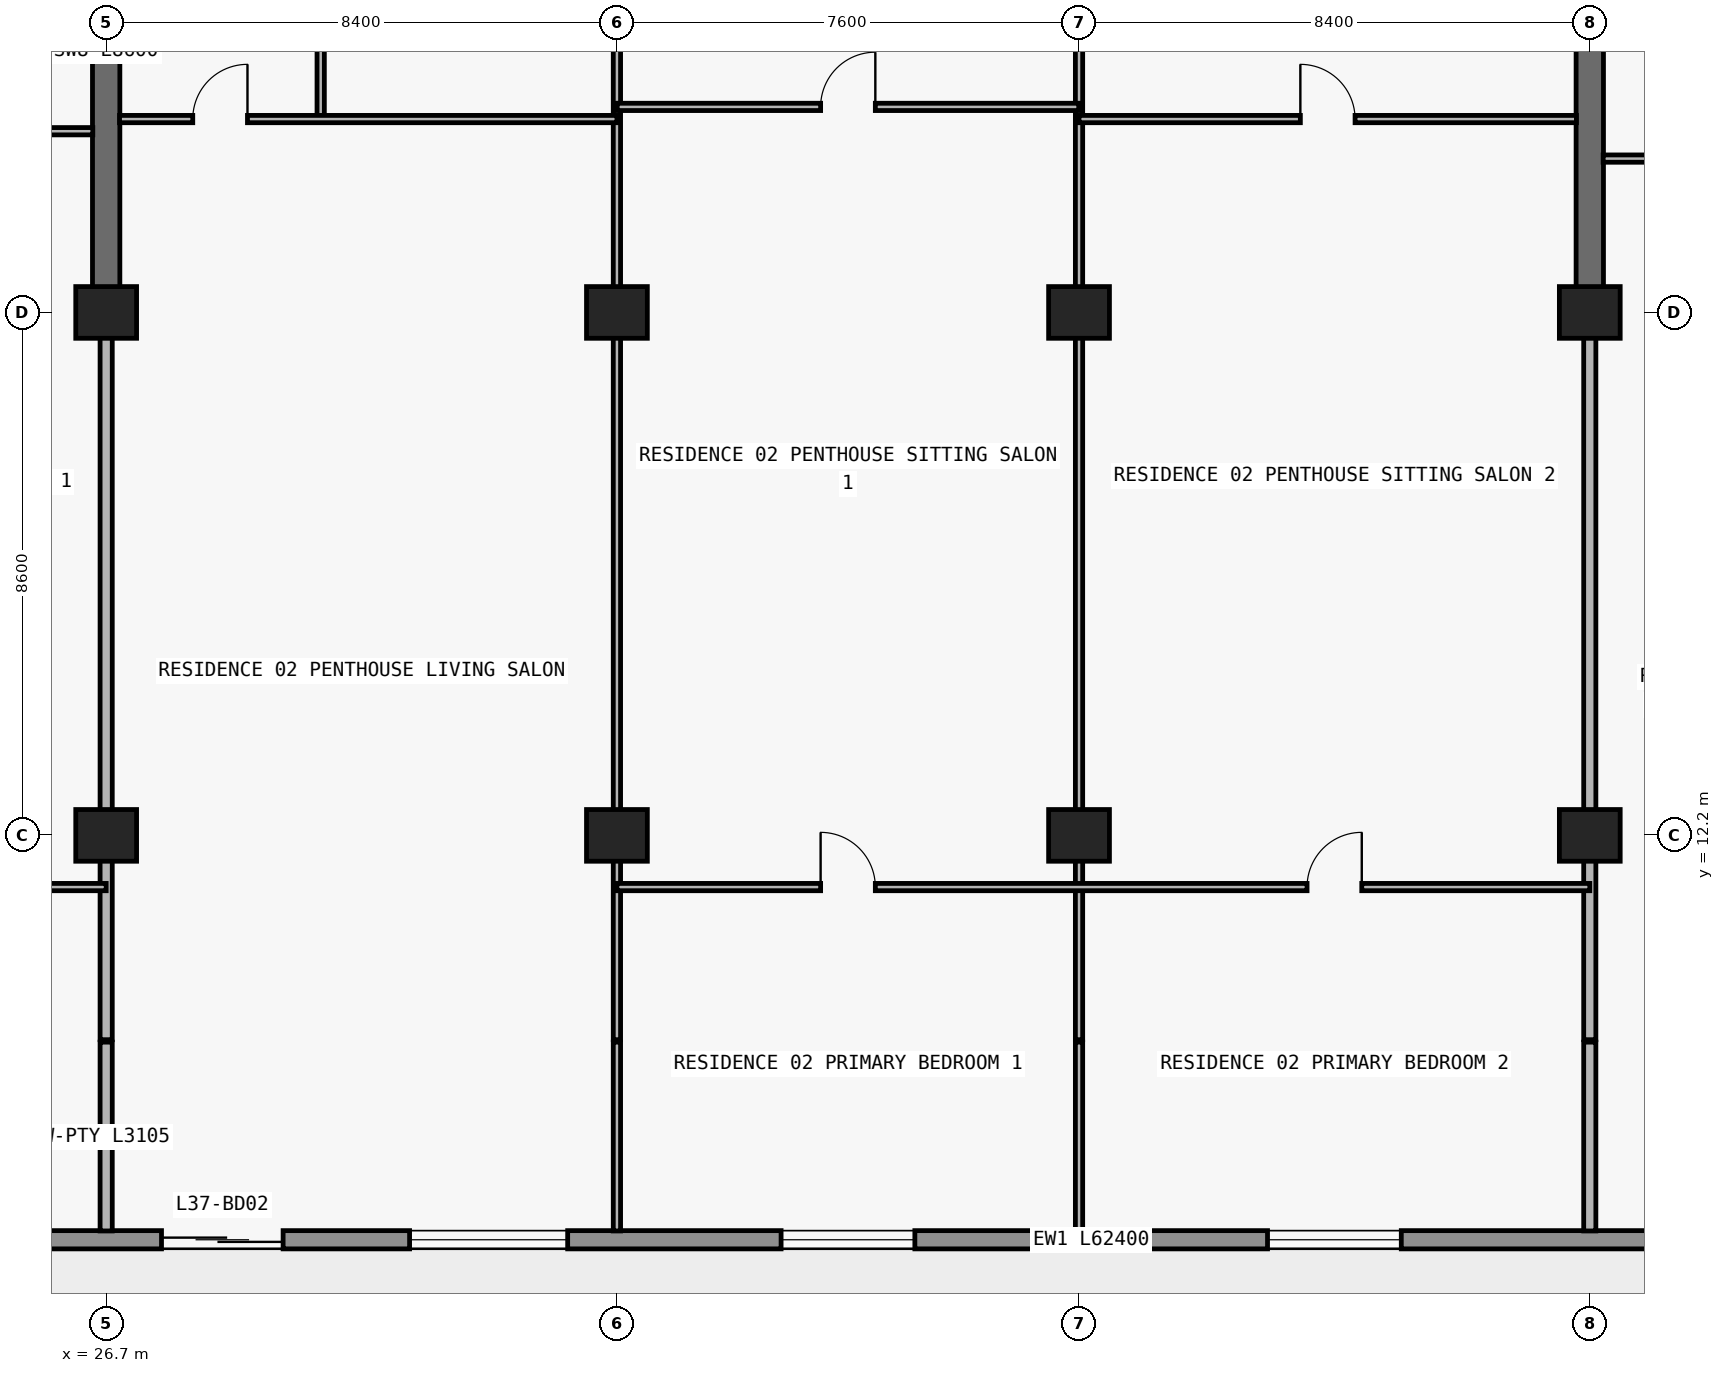
"""IFC4 building model, lengths in metres.
Left out: names, types, materials, properties, quantities, classifications, styles, units other than length and angle.
Written with IfcOpenShell. Run it as: python <this file> out.ifc"""

import sys

from ifc_helpers import new_model, si_unit, direction, frame, frame_2d, origin, origin_2d, place, context, subcontext, project, spatial, rectangle, extrude, element, fill, save


model = new_model("IFC4")
c1 = context("Model", 3, precision=1e-05, world=origin(), true_north=direction((0.0, 1.0)))
c2 = subcontext(c1, "Body", "Model", "MODEL_VIEW")
j1 = project(units=[si_unit("LENGTHUNIT", "METRE"), si_unit("PLANEANGLEUNIT", "RADIAN")], contexts=[c1])
p1 = place(None, origin())
s1 = spatial("IfcSite", under=j1, at=p1, CompositionType="ELEMENT")
p2 = place(p1, origin())
s2 = spatial("IfcBuilding", under=s1, at=p2, CompositionType="ELEMENT")
p3 = place(p2, frame((0.0, 0.0, 135.6)))
s3 = spatial("IfcBuildingStorey", under=s2, at=p3, CompositionType="ELEMENT", Elevation=135.6)
for number, where, z_axis, x_axis in (
    (1, (26.7, 12.2, 0.0), (0.0, 0.0, 1.0), (1.0, 0.0, 0.0)),
    (2, (35.1, 12.2, 0.0), (0.0, 0.0, 1.0), (1.0, 0.0, 0.0)),
    (3, (42.7, 12.2, 0.0), (0.0, 0.0, 1.0), (1.0, 0.0, 0.0)),
    (4, (51.1, 12.2, 0.0), (0.0, 0.0, 1.0), (1.0, 0.0, 0.0)),
    (5, (26.7, 20.8, 0.0), (0.0, 0.0, 1.0), (1.0, 0.0, 0.0)),
    (6, (35.1, 20.8, 0.0), (0.0, 0.0, 1.0), (1.0, 0.0, 0.0)),
    (7, (42.7, 20.8, 0.0), (0.0, 0.0, 1.0), (1.0, 0.0, 0.0)),
    (8, (51.1, 20.8, 0.0), (0.0, 0.0, 1.0), (1.0, 0.0, 0.0)),
):
    element("IfcColumn", number, at=place(p3, frame(where, z_axis=z_axis, x_axis=x_axis)), inside=s3, PredefinedType="COLUMN", context=c2, shape_type="SweptSolid", body=[
        extrude(rectangle(XDim=1.0, YDim=0.85, at=origin_2d()), origin(), (0.0, 0.0, 1.0), 3.05),
    ])
for number, where, z_axis, x_axis in (
    (9, (26.7, 20.8, 0.0), (0.0, 0.0, 1.0), (0.0, 1.0, 0.0)),
    (10, (51.1, 20.8, 0.0), (0.0, 0.0, 1.0), (0.0, 1.0, 0.0)),
):
    element("IfcWall", number, at=place(p3, frame(where, z_axis=z_axis, x_axis=x_axis)), inside=s3, PredefinedType="SHEAR", context=c2, shape_type="SweptSolid", body=[
        extrude(rectangle(XDim=8.6, YDim=0.45, at=frame_2d((4.3, 0.0))), origin(), (0.0, 0.0, 1.0), 3.05),
    ])
p4 = place(p3, frame((70.1, 5.55, 0.0), z_axis=(0.0, 0.0, 1.0), x_axis=(-1.0, 0.0, 0.0)))
e11 = element("IfcWall", 11, at=p4, inside=s3, PredefinedType="STANDARD", context=c2, shape_type="SweptSolid", body=[
    extrude(rectangle(XDim=62.4, YDim=0.3, at=frame_2d((31.2, 0.0))), origin(), (0.0, 0.0, 1.0), 3.05),
])
p5 = place(p4, frame((57.29, 0.0, 0.0)))
e12 = element("IfcOpeningElement", 12, at=p5, cuts=e11, PredefinedType="OPENING", context=c2, shape_type="SweptSolid", body=[
    extrude(rectangle(XDim=2.0, YDim=2.3, at=frame_2d((1.0, 1.15))), frame((0.0, 0.16, 0.0), z_axis=(0.0, -1.0, 0.0), x_axis=(1.0, 0.0, 0.0)), (0.0, 0.0, 1.0), 0.32),
])
p6 = place(p4, frame((52.61, 0.0, 0.65)))
e13 = element("IfcOpeningElement", 13, at=p6, cuts=e11, PredefinedType="OPENING", context=c2, shape_type="SweptSolid", body=[
    extrude(rectangle(XDim=2.6, YDim=1.85, at=frame_2d((1.3, 0.925))), frame((0.0, 0.16, 0.0), z_axis=(0.0, -1.0, 0.0), x_axis=(1.0, 0.0, 0.0)), (0.0, 0.0, 1.0), 0.32),
])
p7 = place(p4, frame((46.5, 0.0, 0.85)))
e14 = element("IfcOpeningElement", 14, at=p7, cuts=e11, PredefinedType="OPENING", context=c2, shape_type="SweptSolid", body=[
    extrude(rectangle(XDim=2.2, YDim=1.55, at=frame_2d((1.1, 0.775))), frame((0.0, 0.16, 0.0), z_axis=(0.0, -1.0, 0.0), x_axis=(1.0, 0.0, 0.0)), (0.0, 0.0, 1.0), 0.32),
])
p8 = place(p4, frame((40.49, 0.0, 0.0)))
e15 = element("IfcOpeningElement", 15, at=p8, cuts=e11, PredefinedType="OPENING", context=c2, shape_type="SweptSolid", body=[
    extrude(rectangle(XDim=2.0, YDim=2.3, at=frame_2d((1.0, 1.15))), frame((0.0, 0.16, 0.0), z_axis=(0.0, -1.0, 0.0), x_axis=(1.0, 0.0, 0.0)), (0.0, 0.0, 1.0), 0.32),
])
p9 = place(p4, frame((35.81, 0.0, 0.65)))
e16 = element("IfcOpeningElement", 16, at=p9, cuts=e11, PredefinedType="OPENING", context=c2, shape_type="SweptSolid", body=[
    extrude(rectangle(XDim=2.6, YDim=1.85, at=frame_2d((1.3, 0.925))), frame((0.0, 0.16, 0.0), z_axis=(0.0, -1.0, 0.0), x_axis=(1.0, 0.0, 0.0)), (0.0, 0.0, 1.0), 0.32),
])
p10 = place(p4, frame((30.1, 0.0, 0.85)))
e17 = element("IfcOpeningElement", 17, at=p10, cuts=e11, PredefinedType="OPENING", context=c2, shape_type="SweptSolid", body=[
    extrude(rectangle(XDim=2.2, YDim=1.55, at=frame_2d((1.1, 0.775))), frame((0.0, 0.16, 0.0), z_axis=(0.0, -1.0, 0.0), x_axis=(1.0, 0.0, 0.0)), (0.0, 0.0, 1.0), 0.32),
])
p11 = place(p4, frame((22.1, 0.0, 0.85)))
e18 = element("IfcOpeningElement", 18, at=p11, cuts=e11, PredefinedType="OPENING", context=c2, shape_type="SweptSolid", body=[
    extrude(rectangle(XDim=2.2, YDim=1.55, at=frame_2d((1.1, 0.775))), frame((0.0, 0.16, 0.0), z_axis=(0.0, -1.0, 0.0), x_axis=(1.0, 0.0, 0.0)), (0.0, 0.0, 1.0), 0.32),
])
p12 = place(p4, frame((16.026, 0.0, 0.0)))
e19 = element("IfcOpeningElement", 19, at=p12, cuts=e11, PredefinedType="OPENING", context=c2, shape_type="SweptSolid", body=[
    extrude(rectangle(XDim=2.0, YDim=2.3, at=frame_2d((1.0, 1.15))), frame((0.0, 0.16, 0.0), z_axis=(0.0, -1.0, 0.0), x_axis=(1.0, 0.0, 0.0)), (0.0, 0.0, 1.0), 0.32),
])
p13 = place(p4, frame((11.726, 0.0, 0.85)))
e20 = element("IfcOpeningElement", 20, at=p13, cuts=e11, PredefinedType="OPENING", context=c2, shape_type="SweptSolid", body=[
    extrude(rectangle(XDim=2.2, YDim=1.55, at=frame_2d((1.1, 0.775))), frame((0.0, 0.16, 0.0), z_axis=(0.0, -1.0, 0.0), x_axis=(1.0, 0.0, 0.0)), (0.0, 0.0, 1.0), 0.32),
])
p14 = place(p4, frame((7.29, 0.0, 0.0)))
e21 = element("IfcOpeningElement", 21, at=p14, cuts=e11, PredefinedType="OPENING", context=c2, shape_type="SweptSolid", body=[
    extrude(rectangle(XDim=2.0, YDim=2.3, at=frame_2d((1.0, 1.15))), frame((0.0, 0.16, 0.0), z_axis=(0.0, -1.0, 0.0), x_axis=(1.0, 0.0, 0.0)), (0.0, 0.0, 1.0), 0.32),
])
p15 = place(p4, frame((3.19, 0.0, 0.85)))
e22 = element("IfcOpeningElement", 22, at=p15, cuts=e11, PredefinedType="OPENING", context=c2, shape_type="SweptSolid", body=[
    extrude(rectangle(XDim=1.8, YDim=1.55, at=frame_2d((0.9, 0.775))), frame((0.0, 0.16, 0.0), z_axis=(0.0, -1.0, 0.0), x_axis=(1.0, 0.0, 0.0)), (0.0, 0.0, 1.0), 0.32),
])
p16 = place(p3, frame((26.7, 5.695, 0.0), z_axis=(0.0, 0.0, 1.0), x_axis=(0.0, 1.0, 0.0)))
e23 = element("IfcWall", 23, at=p16, inside=s3, PredefinedType="PARTITIONING", context=c2, shape_type="SweptSolid", body=[
    extrude(rectangle(XDim=3.105, YDim=0.2, at=frame_2d((1.552, 0.0))), origin(), (0.0, 0.0, 1.0), 3.05),
])
p17 = place(p3, frame((26.7, 8.84, 0.0), z_axis=(0.0, 0.0, 1.0), x_axis=(0.0, 1.0, 0.0)))
e24 = element("IfcWall", 24, at=p17, inside=s3, PredefinedType="PARTITIONING", context=c2, shape_type="SweptSolid", body=[
    extrude(rectangle(XDim=11.955, YDim=0.2, at=frame_2d((5.978, 0.0))), origin(), (0.0, 0.0, 1.0), 2.174),
])
p18 = place(p3, frame((30.228, 23.98, 0.0), z_axis=(0.0, 0.0, 1.0), x_axis=(0.0, 1.0, 0.0)))
e25 = element("IfcWall", 25, at=p18, inside=s3, PredefinedType="PARTITIONING", context=c2, shape_type="SweptSolid", body=[
    extrude(rectangle(XDim=4.8, YDim=0.12, at=frame_2d((2.4, 0.0))), origin(), (0.0, 0.0, 1.0), 3.05),
])
p19 = place(p18, frame((1.95, 0.0, 0.0)))
e26 = element("IfcOpeningElement", 26, at=p19, cuts=e25, PredefinedType="OPENING", context=c2, shape_type="SweptSolid", body=[
    extrude(rectangle(XDim=0.9, YDim=2.15, at=frame_2d((0.45, 1.075))), frame((0.0, 0.07, 0.0), z_axis=(0.0, -1.0, 0.0), x_axis=(1.0, 0.0, 0.0)), (0.0, 0.0, 1.0), 0.14),
])
p20 = place(p3, frame((35.1, 5.695, 0.0), z_axis=(0.0, 0.0, 1.0), x_axis=(0.0, 1.0, 0.0)))
e27 = element("IfcWall", 27, at=p20, inside=s3, PredefinedType="PARTITIONING", context=c2, shape_type="SweptSolid", body=[
    extrude(rectangle(XDim=3.105, YDim=0.12, at=frame_2d((1.552, 0.0))), origin(), (0.0, 0.0, 1.0), 3.05),
])
p21 = place(p3, frame((35.1, 8.84, 0.0), z_axis=(0.0, 0.0, 1.0), x_axis=(0.0, 1.0, 0.0)))
e28 = element("IfcWall", 28, at=p21, inside=s3, PredefinedType="PARTITIONING", context=c2, shape_type="SweptSolid", body=[
    extrude(rectangle(XDim=19.94, YDim=0.12, at=frame_2d((9.97, 0.0))), origin(), (0.0, 0.0, 1.0), 2.174),
])
p22 = place(p21, frame((17.09, 0.0, 0.0)))
e29 = element("IfcOpeningElement", 29, at=p22, cuts=e28, PredefinedType="OPENING", context=c2, shape_type="SweptSolid", body=[
    extrude(rectangle(XDim=0.9, YDim=2.124, at=frame_2d((0.45, 1.062))), frame((0.0, 0.07, 0.0), z_axis=(0.0, -1.0, 0.0), x_axis=(1.0, 0.0, 0.0)), (0.0, 0.0, 1.0), 0.14),
])
p23 = place(p3, frame((42.7, 5.695, 0.0), z_axis=(0.0, 0.0, 1.0), x_axis=(0.0, 1.0, 0.0)))
e30 = element("IfcWall", 30, at=p23, inside=s3, PredefinedType="PARTITIONING", context=c2, shape_type="SweptSolid", body=[
    extrude(rectangle(XDim=3.105, YDim=0.12, at=frame_2d((1.552, 0.0))), origin(), (0.0, 0.0, 1.0), 3.05),
])
p24 = place(p3, frame((42.7, 8.84, 0.0), z_axis=(0.0, 0.0, 1.0), x_axis=(0.0, 1.0, 0.0)))
e31 = element("IfcWall", 31, at=p24, inside=s3, PredefinedType="PARTITIONING", context=c2, shape_type="SweptSolid", body=[
    extrude(rectangle(XDim=19.94, YDim=0.12, at=frame_2d((9.97, 0.0))), origin(), (0.0, 0.0, 1.0), 2.174),
])
p25 = place(p24, frame((17.09, 0.0, 0.0)))
e32 = element("IfcOpeningElement", 32, at=p25, cuts=e31, PredefinedType="OPENING", context=c2, shape_type="SweptSolid", body=[
    extrude(rectangle(XDim=0.9, YDim=2.124, at=frame_2d((0.45, 1.062))), frame((0.0, 0.07, 0.0), z_axis=(0.0, -1.0, 0.0), x_axis=(1.0, 0.0, 0.0)), (0.0, 0.0, 1.0), 0.14),
])
p26 = place(p3, frame((51.1, 5.695, 0.0), z_axis=(0.0, 0.0, 1.0), x_axis=(0.0, 1.0, 0.0)))
e33 = element("IfcWall", 33, at=p26, inside=s3, PredefinedType="PARTITIONING", context=c2, shape_type="SweptSolid", body=[
    extrude(rectangle(XDim=3.105, YDim=0.2, at=frame_2d((1.552, 0.0))), origin(), (0.0, 0.0, 1.0), 3.05),
])
p27 = place(p3, frame((51.1, 8.84, 0.0), z_axis=(0.0, 0.0, 1.0), x_axis=(0.0, 1.0, 0.0)))
e34 = element("IfcWall", 34, at=p27, inside=s3, PredefinedType="PARTITIONING", context=c2, shape_type="SweptSolid", body=[
    extrude(rectangle(XDim=11.955, YDim=0.2, at=frame_2d((5.978, 0.0))), origin(), (0.0, 0.0, 1.0), 2.174),
])
p28 = place(p3, frame((18.3, 11.35, 0.0), z_axis=(0.0, 0.0, 1.0), x_axis=(1.0, 0.0, 0.0)))
e35 = element("IfcWall", 35, at=p28, inside=s3, PredefinedType="PARTITIONING", context=c2, shape_type="SweptSolid", body=[
    extrude(rectangle(XDim=8.4, YDim=0.12, at=frame_2d((4.2, 0.0))), origin(), (0.0, 0.0, 1.0), 3.05),
])
p29 = place(p28, frame((3.75, 0.0, 0.0)))
e36 = element("IfcOpeningElement", 36, at=p29, cuts=e35, PredefinedType="OPENING", context=c2, shape_type="SweptSolid", body=[
    extrude(rectangle(XDim=0.9, YDim=2.15, at=frame_2d((0.45, 1.075))), frame((0.0, 0.07, 0.0), z_axis=(0.0, -1.0, 0.0), x_axis=(1.0, 0.0, 0.0)), (0.0, 0.0, 1.0), 0.14),
])
p30 = place(p3, frame((35.1, 11.35, 0.0), z_axis=(0.0, 0.0, 1.0), x_axis=(1.0, 0.0, 0.0)))
e37 = element("IfcWall", 37, at=p30, inside=s3, PredefinedType="PARTITIONING", context=c2, shape_type="SweptSolid", body=[
    extrude(rectangle(XDim=16.0, YDim=0.12, at=frame_2d((8.0, 0.0))), origin(), (0.0, 0.0, 1.0), 3.05),
])
p31 = place(p30, frame((3.35, 0.0, 0.0)))
e38 = element("IfcOpeningElement", 38, at=p31, cuts=e37, PredefinedType="OPENING", context=c2, shape_type="SweptSolid", body=[
    extrude(rectangle(XDim=0.9, YDim=2.15, at=frame_2d((0.45, 1.075))), frame((0.0, 0.07, 0.0), z_axis=(0.0, -1.0, 0.0), x_axis=(1.0, 0.0, 0.0)), (0.0, 0.0, 1.0), 0.14),
])
p32 = place(p30, frame((11.35, 0.0, 0.0)))
e39 = element("IfcOpeningElement", 39, at=p32, cuts=e37, PredefinedType="OPENING", context=c2, shape_type="SweptSolid", body=[
    extrude(rectangle(XDim=0.9, YDim=2.15, at=frame_2d((0.45, 1.075))), frame((0.0, 0.07, 0.0), z_axis=(0.0, -1.0, 0.0), x_axis=(1.0, 0.0, 0.0)), (0.0, 0.0, 1.0), 0.14),
])
p33 = place(p3, frame((51.32, 23.33, 0.0), z_axis=(0.0, 0.0, 1.0), x_axis=(1.0, 0.0, 0.0)))
e40 = element("IfcWall", 40, at=p33, inside=s3, PredefinedType="PARTITIONING", context=c2, shape_type="SweptSolid", body=[
    extrude(rectangle(XDim=4.566, YDim=0.12, at=frame_2d((2.283, 0.0))), origin(), (0.0, 0.0, 1.0), 3.05),
])
p34 = place(p33, frame((1.414, 0.0, 0.0)))
e41 = element("IfcOpeningElement", 41, at=p34, cuts=e40, PredefinedType="OPENING", context=c2, shape_type="SweptSolid", body=[
    extrude(rectangle(XDim=0.9, YDim=2.15, at=frame_2d((0.45, 1.075))), frame((0.0, 0.07, 0.0), z_axis=(0.0, -1.0, 0.0), x_axis=(1.0, 0.0, 0.0)), (0.0, 0.0, 1.0), 0.14),
])
p35 = place(p3, frame((18.3, 23.78, 0.0), z_axis=(0.0, 0.0, 1.0), x_axis=(1.0, 0.0, 0.0)))
e42 = element("IfcWall", 42, at=p35, inside=s3, PredefinedType="PARTITIONING", context=c2, shape_type="SweptSolid", body=[
    extrude(rectangle(XDim=8.18, YDim=0.12, at=frame_2d((4.09, 0.0))), origin(), (0.0, 0.0, 1.0), 3.05),
])
p36 = place(p35, frame((3.64, 0.0, 0.0)))
e43 = element("IfcOpeningElement", 43, at=p36, cuts=e42, PredefinedType="OPENING", context=c2, shape_type="SweptSolid", body=[
    extrude(rectangle(XDim=0.9, YDim=2.15, at=frame_2d((0.45, 1.075))), frame((0.0, 0.07, 0.0), z_axis=(0.0, -1.0, 0.0), x_axis=(1.0, 0.0, 0.0)), (0.0, 0.0, 1.0), 0.14),
])
p37 = place(p3, frame((26.92, 23.98, 0.0), z_axis=(0.0, 0.0, 1.0), x_axis=(1.0, 0.0, 0.0)))
e44 = element("IfcWall", 44, at=p37, inside=s3, PredefinedType="PARTITIONING", context=c2, shape_type="SweptSolid", body=[
    extrude(rectangle(XDim=8.18, YDim=0.12, at=frame_2d((4.09, 0.0))), origin(), (0.0, 0.0, 1.0), 3.05),
])
p38 = place(p37, frame((1.204, 0.0, 0.0)))
e45 = element("IfcOpeningElement", 45, at=p38, cuts=e44, PredefinedType="OPENING", context=c2, shape_type="SweptSolid", body=[
    extrude(rectangle(XDim=0.9, YDim=2.15, at=frame_2d((0.45, 1.075))), frame((0.0, 0.07, 0.0), z_axis=(0.0, -1.0, 0.0), x_axis=(1.0, 0.0, 0.0)), (0.0, 0.0, 1.0), 0.14),
])
p39 = place(p3, frame((42.7, 23.98, 0.0), z_axis=(0.0, 0.0, 1.0), x_axis=(1.0, 0.0, 0.0)))
e46 = element("IfcWall", 46, at=p39, inside=s3, PredefinedType="PARTITIONING", context=c2, shape_type="SweptSolid", body=[
    extrude(rectangle(XDim=8.18, YDim=0.12, at=frame_2d((4.09, 0.0))), origin(), (0.0, 0.0, 1.0), 3.05),
])
p40 = place(p39, frame((3.64, 0.0, 0.0)))
e47 = element("IfcOpeningElement", 47, at=p40, cuts=e46, PredefinedType="OPENING", context=c2, shape_type="SweptSolid", body=[
    extrude(rectangle(XDim=0.9, YDim=2.15, at=frame_2d((0.45, 1.075))), frame((0.0, 0.07, 0.0), z_axis=(0.0, -1.0, 0.0), x_axis=(1.0, 0.0, 0.0)), (0.0, 0.0, 1.0), 0.14),
])
p41 = place(p3, frame((35.105, 24.18, 0.0), z_axis=(0.0, 0.0, 1.0), x_axis=(1.0, 0.0, 0.0)))
e48 = element("IfcWall", 48, at=p41, inside=s3, PredefinedType="PARTITIONING", context=c2, shape_type="SweptSolid", body=[
    extrude(rectangle(XDim=7.59, YDim=0.12, at=frame_2d((3.795, 0.0))), origin(), (0.0, 0.0, 1.0), 3.05),
])
p42 = place(p41, frame((3.345, 0.0, 0.0)))
e49 = element("IfcOpeningElement", 49, at=p42, cuts=e48, PredefinedType="OPENING", context=c2, shape_type="SweptSolid", body=[
    extrude(rectangle(XDim=0.9, YDim=2.15, at=frame_2d((0.45, 1.075))), frame((0.0, 0.07, 0.0), z_axis=(0.0, -1.0, 0.0), x_axis=(1.0, 0.0, 0.0)), (0.0, 0.0, 1.0), 0.14),
])
p43 = place(p8, origin())
e50 = element("IfcDoor", 50, at=p43, inside=s3, OperationType="DOUBLE_DOOR_SLIDING", PredefinedType="DOOR", context=c2, shape_type="SweptSolid", body=[
    extrude(rectangle(XDim=2.0, YDim=2.3, at=frame_2d((1.0, 1.15))), frame((0.0, 0.025, 0.0), z_axis=(0.0, -1.0, 0.0), x_axis=(1.0, 0.0, 0.0)), (0.0, 0.0, 1.0), 0.05),
])
fill(e15, e50)
p44 = place(p9, origin())
e51 = element("IfcWindow", 51, at=p44, inside=s3, PartitioningType="SINGLE_PANEL", PredefinedType="WINDOW", context=c2, shape_type="SweptSolid", body=[
    extrude(rectangle(XDim=2.6, YDim=1.85, at=frame_2d((1.3, 0.925))), frame((0.0, 0.03, 0.0), z_axis=(0.0, -1.0, 0.0), x_axis=(1.0, 0.0, 0.0)), (0.0, 0.0, 1.0), 0.06),
])
fill(e16, e51)
p45 = place(p10, origin())
e52 = element("IfcWindow", 52, at=p45, inside=s3, PartitioningType="SINGLE_PANEL", PredefinedType="WINDOW", context=c2, shape_type="SweptSolid", body=[
    extrude(rectangle(XDim=2.2, YDim=1.55, at=frame_2d((1.1, 0.775))), frame((0.0, 0.03, 0.0), z_axis=(0.0, -1.0, 0.0), x_axis=(1.0, 0.0, 0.0)), (0.0, 0.0, 1.0), 0.06),
])
fill(e17, e52)
p46 = place(p11, origin())
e53 = element("IfcWindow", 53, at=p46, inside=s3, PartitioningType="SINGLE_PANEL", PredefinedType="WINDOW", context=c2, shape_type="SweptSolid", body=[
    extrude(rectangle(XDim=2.2, YDim=1.55, at=frame_2d((1.1, 0.775))), frame((0.0, 0.03, 0.0), z_axis=(0.0, -1.0, 0.0), x_axis=(1.0, 0.0, 0.0)), (0.0, 0.0, 1.0), 0.06),
])
fill(e18, e53)
p47 = place(p38, origin())
e54 = element("IfcDoor", 54, at=p47, inside=s3, OperationType="SINGLE_SWING_RIGHT", PredefinedType="DOOR", context=c2, shape_type="SweptSolid", body=[
    extrude(rectangle(XDim=0.9, YDim=2.15, at=frame_2d((0.45, 1.075))), frame((0.0, 0.025, 0.0), z_axis=(0.0, -1.0, 0.0), x_axis=(1.0, 0.0, 0.0)), (0.0, 0.0, 1.0), 0.05),
])
fill(e45, e54)
p48 = place(p42, origin())
e55 = element("IfcDoor", 55, at=p48, inside=s3, OperationType="SINGLE_SWING_RIGHT", PredefinedType="DOOR", context=c2, shape_type="SweptSolid", body=[
    extrude(rectangle(XDim=0.9, YDim=2.15, at=frame_2d((0.45, 1.075))), frame((0.0, 0.025, 0.0), z_axis=(0.0, -1.0, 0.0), x_axis=(1.0, 0.0, 0.0)), (0.0, 0.0, 1.0), 0.05),
])
fill(e49, e55)
p49 = place(p31, origin())
e56 = element("IfcDoor", 56, at=p49, inside=s3, OperationType="SINGLE_SWING_LEFT", PredefinedType="DOOR", context=c2, shape_type="SweptSolid", body=[
    extrude(rectangle(XDim=0.9, YDim=2.15, at=frame_2d((0.45, 1.075))), frame((0.0, 0.025, 0.0), z_axis=(0.0, -1.0, 0.0), x_axis=(1.0, 0.0, 0.0)), (0.0, 0.0, 1.0), 0.05),
])
fill(e38, e56)
p50 = place(p40, origin())
e57 = element("IfcDoor", 57, at=p50, inside=s3, OperationType="SINGLE_SWING_LEFT", PredefinedType="DOOR", context=c2, shape_type="SweptSolid", body=[
    extrude(rectangle(XDim=0.9, YDim=2.15, at=frame_2d((0.45, 1.075))), frame((0.0, 0.025, 0.0), z_axis=(0.0, -1.0, 0.0), x_axis=(1.0, 0.0, 0.0)), (0.0, 0.0, 1.0), 0.05),
])
fill(e47, e57)
p51 = place(p32, origin())
e58 = element("IfcDoor", 58, at=p51, inside=s3, OperationType="SINGLE_SWING_RIGHT", PredefinedType="DOOR", context=c2, shape_type="SweptSolid", body=[
    extrude(rectangle(XDim=0.9, YDim=2.15, at=frame_2d((0.45, 1.075))), frame((0.0, 0.025, 0.0), z_axis=(0.0, -1.0, 0.0), x_axis=(1.0, 0.0, 0.0)), (0.0, 0.0, 1.0), 0.05),
])
fill(e39, e58)
save(model, sys.argv[1])
